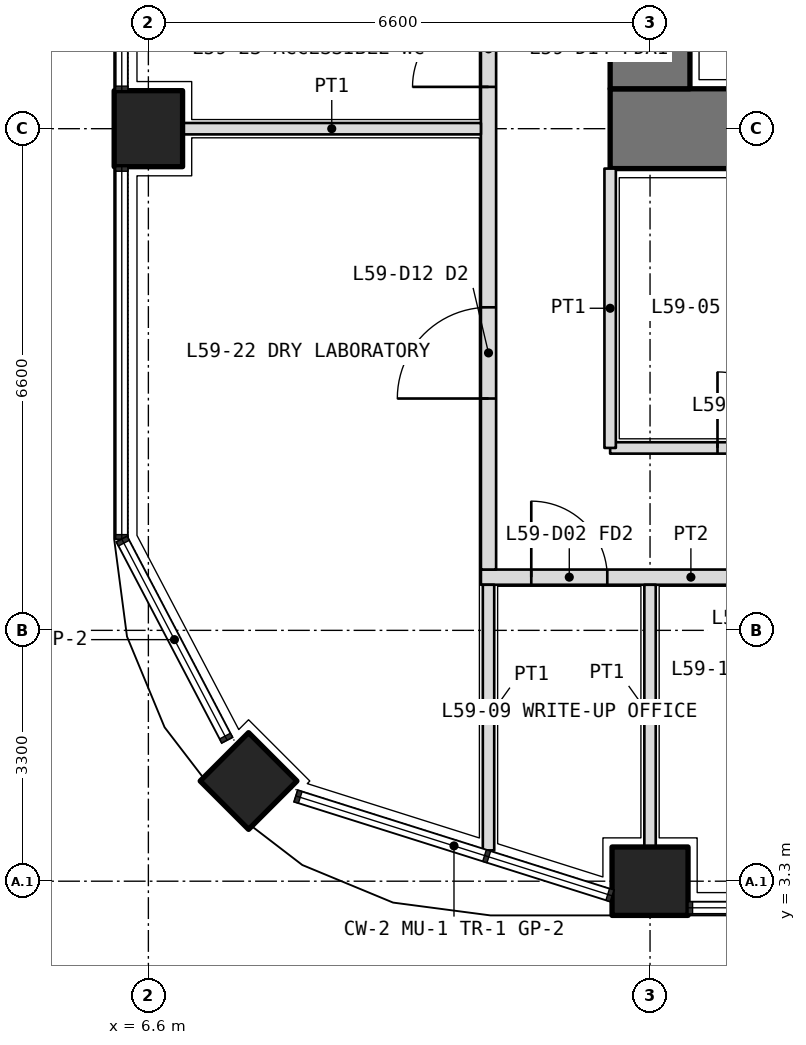
"""IFC4 building model, lengths in metres.
Left out: names, types, materials, properties, quantities, classifications, styles, units other than length and angle.
Written with IfcOpenShell. Run it as: python <this file> out.ifc"""

import sys

from ifc_helpers import new_model, si_unit, direction, frame, frame_2d, origin, origin_2d, place, context, subcontext, project, spatial, rectangle, extrude, element, fill, save


model = new_model("IFC4")
c1 = context("Model", 3, precision=1e-05, world=origin(), true_north=direction((0.0, 1.0)))
c2 = subcontext(c1, "Body", "Model", "MODEL_VIEW")
j1 = project(units=[si_unit("LENGTHUNIT", "METRE"), si_unit("PLANEANGLEUNIT", "RADIAN")], contexts=[c1])
p1 = place(None, origin())
s1 = spatial("IfcSite", under=j1, at=p1, CompositionType="ELEMENT")
p2 = place(p1, origin())
s2 = spatial("IfcBuilding", under=s1, at=p2, CompositionType="ELEMENT")
p3 = place(p2, frame((0.0, 0.0, 258.6)))
s3 = spatial("IfcBuildingStorey", under=s2, at=p3, CompositionType="ELEMENT", Elevation=258.6)
p4 = place(p3, frame((7.918, 4.618, 0.0), z_axis=(0.0, 0.0, 1.0), x_axis=(0.707106781187, 0.707106781187, 0.0)))
e1 = element("IfcColumn", 1, at=p4, inside=s3, PredefinedType="COLUMN", context=c2, shape_type="SweptSolid", body=[
    extrude(rectangle(XDim=0.9, YDim=0.9, at=origin_2d()), origin(), (0.0, 0.0, 1.0), 4.2),
])
for number, where, z_axis, x_axis in (
    (2, (13.2, 3.3, 0.0), (0.0, 0.0, 1.0), (1.0, 0.0, 0.0)),
    (3, (6.6, 13.2, 0.0), (0.0, 0.0, 1.0), (0.0, 1.0, 0.0)),
):
    element("IfcColumn", number, at=place(p3, frame(where, z_axis=z_axis, x_axis=x_axis)), inside=s3, PredefinedType="COLUMN", context=c2, shape_type="SweptSolid", body=[
        extrude(rectangle(XDim=1.0, YDim=0.9, at=origin_2d()), origin(), (0.0, 0.0, 1.0), 4.2),
    ])
p5 = place(p3, frame((12.675, 13.2, 0.0), z_axis=(0.0, 0.0, 1.0), x_axis=(1.0, 0.0, 0.0)))
e4 = element("IfcWall", 4, at=p5, inside=s3, PredefinedType="SHEAR", context=c2, shape_type="SweptSolid", body=[
    extrude(rectangle(XDim=27.45, YDim=1.05, at=frame_2d((13.725, 0.0))), origin(), (0.0, 0.0, 1.0), 4.2),
])
p6 = place(p3, frame((13.2, 32.475, 0.0), z_axis=(0.0, 0.0, 1.0), x_axis=(0.0, -1.0, 0.0)))
e5 = element("IfcWall", 5, at=p6, inside=s3, PredefinedType="SHEAR", context=c2, shape_type="SweptSolid", body=[
    extrude(rectangle(XDim=18.75, YDim=1.05, at=frame_2d((9.375, 0.0))), origin(), (0.0, 0.0, 1.0), 4.2),
])
p7 = place(p6, frame((14.125, 0.0, 0.0)))
e6 = element("IfcOpeningElement", 6, at=p7, cuts=e5, PredefinedType="OPENING", context=c2, shape_type="SweptSolid", body=[
    extrude(rectangle(XDim=1.6, YDim=2.1, at=frame_2d((0.8, 1.05))), frame((0.0, 0.535, 0.0), z_axis=(0.0, -1.0, 0.0), x_axis=(1.0, 0.0, 0.0)), (0.0, 0.0, 1.0), 1.07),
])
p8 = place(p6, frame((3.325, 0.0, 0.0)))
e7 = element("IfcOpeningElement", 7, at=p8, cuts=e5, PredefinedType="OPENING", context=c2, shape_type="SweptSolid", body=[
    extrude(rectangle(XDim=1.6, YDim=2.1, at=frame_2d((0.8, 1.05))), frame((0.0, 0.535, 0.0), z_axis=(0.0, -1.0, 0.0), x_axis=(1.0, 0.0, 0.0)), (0.0, 0.0, 1.0), 1.07),
])
p9 = place(p3, frame((12.675, 9.0, 0.0), z_axis=(0.0, 0.0, 1.0), x_axis=(1.0, 0.0, 0.0)))
e8 = element("IfcWall", 8, at=p9, inside=s3, PredefinedType="PARTITIONING", context=c2, shape_type="SweptSolid", body=[
    extrude(rectangle(XDim=27.45, YDim=0.15, at=frame_2d((13.725, 0.0))), origin(), (0.0, 0.0, 1.0), 3.0),
])
p10 = place(p9, frame((1.413, 0.0, 0.0)))
e9 = element("IfcOpeningElement", 9, at=p10, cuts=e8, PredefinedType="OPENING", context=c2, shape_type="SweptSolid", body=[
    extrude(rectangle(XDim=1.0, YDim=2.1, at=frame_2d((0.5, 1.05))), frame((0.0, 0.085, 0.0), z_axis=(0.0, -1.0, 0.0), x_axis=(1.0, 0.0, 0.0)), (0.0, 0.0, 1.0), 0.17),
])
p11 = place(p9, frame((8.275, 0.0, 0.0)))
e10 = element("IfcOpeningElement", 10, at=p11, cuts=e8, PredefinedType="OPENING", context=c2, shape_type="SweptSolid", body=[
    extrude(rectangle(XDim=1.0, YDim=2.1, at=frame_2d((0.5, 1.05))), frame((0.0, 0.085, 0.0), z_axis=(0.0, -1.0, 0.0), x_axis=(1.0, 0.0, 0.0)), (0.0, 0.0, 1.0), 0.17),
])
p12 = place(p9, frame((14.875, 0.0, 0.0)))
e11 = element("IfcOpeningElement", 11, at=p12, cuts=e8, PredefinedType="OPENING", context=c2, shape_type="SweptSolid", body=[
    extrude(rectangle(XDim=1.0, YDim=2.1, at=frame_2d((0.5, 1.05))), frame((0.0, 0.085, 0.0), z_axis=(0.0, -1.0, 0.0), x_axis=(1.0, 0.0, 0.0)), (0.0, 0.0, 1.0), 0.17),
])
p13 = place(p9, frame((21.738, 0.0, 0.0)))
e12 = element("IfcOpeningElement", 12, at=p13, cuts=e8, PredefinedType="OPENING", context=c2, shape_type="SweptSolid", body=[
    extrude(rectangle(XDim=1.0, YDim=2.1, at=frame_2d((0.5, 1.05))), frame((0.0, 0.085, 0.0), z_axis=(0.0, -1.0, 0.0), x_axis=(1.0, 0.0, 0.0)), (0.0, 0.0, 1.0), 0.17),
])
p14 = place(p3, frame((12.675, 12.675, 0.0), z_axis=(0.0, 0.0, 1.0), x_axis=(0.0, -1.0, 0.0)))
e13 = element("IfcWall", 13, at=p14, inside=s3, PredefinedType="PARTITIONING", context=c2, shape_type="SweptSolid", body=[
    extrude(rectangle(XDim=3.675, YDim=0.15, at=frame_2d((1.837, 0.0))), origin(), (0.0, 0.0, 1.0), 3.0),
])
p15 = place(p3, frame((10.975, 7.3, 0.0), z_axis=(0.0, 0.0, 1.0), x_axis=(1.0, 0.0, 0.0)))
e14 = element("IfcWall", 14, at=p15, inside=s3, PredefinedType="PARTITIONING", context=c2, shape_type="SweptSolid", body=[
    extrude(rectangle(XDim=5.525, YDim=0.2, at=frame_2d((2.762, 0.0))), origin(), (0.0, 0.0, 1.0), 3.0),
])
p16 = place(p15, frame((0.663, 0.0, 0.0)))
e15 = element("IfcOpeningElement", 15, at=p16, cuts=e14, PredefinedType="OPENING", context=c2, shape_type="SweptSolid", body=[
    extrude(rectangle(XDim=1.0, YDim=2.1, at=frame_2d((0.5, 1.05))), frame((0.0, 0.11, 0.0), z_axis=(0.0, -1.0, 0.0), x_axis=(1.0, 0.0, 0.0)), (0.0, 0.0, 1.0), 0.22),
])
p17 = place(p15, frame((3.375, 0.0, 0.0)))
e16 = element("IfcOpeningElement", 16, at=p17, cuts=e14, PredefinedType="OPENING", context=c2, shape_type="SweptSolid", body=[
    extrude(rectangle(XDim=1.0, YDim=2.1, at=frame_2d((0.5, 1.05))), frame((0.0, 0.11, 0.0), z_axis=(0.0, -1.0, 0.0), x_axis=(1.0, 0.0, 0.0)), (0.0, 0.0, 1.0), 0.22),
])
p18 = place(p3, frame((11.075, 7.4, 0.0), z_axis=(0.0, 0.0, 1.0), x_axis=(0.0, 1.0, 0.0)))
e17 = element("IfcWall", 17, at=p18, inside=s3, PredefinedType="PARTITIONING", context=c2, shape_type="SweptSolid", body=[
    extrude(rectangle(XDim=31.4, YDim=0.2, at=frame_2d((15.7, 0.0))), origin(), (0.0, 0.0, 1.0), 3.0),
])
p19 = place(p18, frame((2.25, 0.0, 0.0)))
e18 = element("IfcOpeningElement", 18, at=p19, cuts=e17, PredefinedType="OPENING", context=c2, shape_type="SweptSolid", body=[
    extrude(rectangle(XDim=1.2, YDim=2.1, at=frame_2d((0.6, 1.05))), frame((0.0, 0.11, 0.0), z_axis=(0.0, -1.0, 0.0), x_axis=(1.0, 0.0, 0.0)), (0.0, 0.0, 1.0), 0.22),
])
p20 = place(p18, frame((6.35, 0.0, 0.0)))
e19 = element("IfcOpeningElement", 19, at=p20, cuts=e17, PredefinedType="OPENING", context=c2, shape_type="SweptSolid", body=[
    extrude(rectangle(XDim=1.0, YDim=2.1, at=frame_2d((0.5, 1.05))), frame((0.0, 0.11, 0.0), z_axis=(0.0, -1.0, 0.0), x_axis=(1.0, 0.0, 0.0)), (0.0, 0.0, 1.0), 0.22),
])
p21 = place(p18, frame((9.45, 0.0, 0.0)))
e20 = element("IfcOpeningElement", 20, at=p21, cuts=e17, PredefinedType="OPENING", context=c2, shape_type="SweptSolid", body=[
    extrude(rectangle(XDim=0.9, YDim=2.1, at=frame_2d((0.45, 1.05))), frame((0.0, 0.11, 0.0), z_axis=(0.0, -1.0, 0.0), x_axis=(1.0, 0.0, 0.0)), (0.0, 0.0, 1.0), 0.22),
])
p22 = place(p18, frame((13.35, 0.0, 0.0)))
e21 = element("IfcOpeningElement", 21, at=p22, cuts=e17, PredefinedType="OPENING", context=c2, shape_type="SweptSolid", body=[
    extrude(rectangle(XDim=0.9, YDim=2.1, at=frame_2d((0.45, 1.05))), frame((0.0, 0.11, 0.0), z_axis=(0.0, -1.0, 0.0), x_axis=(1.0, 0.0, 0.0)), (0.0, 0.0, 1.0), 0.22),
])
p23 = place(p18, frame((16.85, 0.0, 0.0)))
e22 = element("IfcOpeningElement", 22, at=p23, cuts=e17, PredefinedType="OPENING", context=c2, shape_type="SweptSolid", body=[
    extrude(rectangle(XDim=1.0, YDim=2.1, at=frame_2d((0.5, 1.05))), frame((0.0, 0.11, 0.0), z_axis=(0.0, -1.0, 0.0), x_axis=(1.0, 0.0, 0.0)), (0.0, 0.0, 1.0), 0.22),
])
p24 = place(p18, frame((24.75, 0.0, 0.0)))
e23 = element("IfcOpeningElement", 23, at=p24, cuts=e17, PredefinedType="OPENING", context=c2, shape_type="SweptSolid", body=[
    extrude(rectangle(XDim=1.0, YDim=2.1, at=frame_2d((0.5, 1.05))), frame((0.0, 0.11, 0.0), z_axis=(0.0, -1.0, 0.0), x_axis=(1.0, 0.0, 0.0)), (0.0, 0.0, 1.0), 0.22),
])
p25 = place(p3, frame((11.075, 3.705, 0.0), z_axis=(0.0, 0.0, 1.0), x_axis=(0.0, 1.0, 0.0)))
e24 = element("IfcWall", 24, at=p25, inside=s3, PredefinedType="PARTITIONING", context=c2, shape_type="SweptSolid", body=[
    extrude(rectangle(XDim=3.495, YDim=0.15, at=frame_2d((1.748, 0.0))), origin(), (0.0, 0.0, 1.0), 2.7),
])
p26 = place(p3, frame((13.2, 3.75, 0.0), z_axis=(0.0, 0.0, 1.0), x_axis=(0.0, 1.0, 0.0)))
e25 = element("IfcWall", 25, at=p26, inside=s3, PredefinedType="PARTITIONING", context=c2, shape_type="SweptSolid", body=[
    extrude(rectangle(XDim=3.45, YDim=0.15, at=frame_2d((1.725, 0.0))), origin(), (0.0, 0.0, 1.0), 3.0),
])
p27 = place(p3, frame((7.05, 13.2, 0.0), z_axis=(0.0, 0.0, 1.0), x_axis=(1.0, 0.0, 0.0)))
e26 = element("IfcWall", 26, at=p27, inside=s3, PredefinedType="PARTITIONING", context=c2, shape_type="SweptSolid", body=[
    extrude(rectangle(XDim=3.925, YDim=0.15, at=frame_2d((1.962, 0.0))), origin(), (0.0, 0.0, 1.0), 3.0),
])
p28 = place(p10, origin())
e27 = element("IfcDoor", 27, at=p28, inside=s3, OperationType="SINGLE_SWING_LEFT", PredefinedType="DOOR", context=c2, shape_type="SweptSolid", body=[
    extrude(rectangle(XDim=1.0, YDim=2.1, at=frame_2d((0.5, 1.05))), frame((0.0, 0.025, 0.0), z_axis=(0.0, -1.0, 0.0), x_axis=(1.0, 0.0, 0.0)), (0.0, 0.0, 1.0), 0.05),
])
fill(e9, e27)
p29 = place(p16, origin())
e28 = element("IfcDoor", 28, at=p29, inside=s3, OperationType="SINGLE_SWING_LEFT", PredefinedType="DOOR", context=c2, shape_type="SweptSolid", body=[
    extrude(rectangle(XDim=1.0, YDim=2.1, at=frame_2d((0.5, 1.05))), frame((0.0, 0.025, 0.0), z_axis=(0.0, -1.0, 0.0), x_axis=(1.0, 0.0, 0.0)), (0.0, 0.0, 1.0), 0.05),
])
fill(e15, e28)
p30 = place(p19, origin())
e29 = element("IfcDoor", 29, at=p30, inside=s3, OperationType="DOUBLE_DOOR_SINGLE_SWING", PredefinedType="DOOR", context=c2, shape_type="SweptSolid", body=[
    extrude(rectangle(XDim=1.2, YDim=2.1, at=frame_2d((0.6, 1.05))), frame((0.0, 0.025, 0.0), z_axis=(0.0, -1.0, 0.0), x_axis=(1.0, 0.0, 0.0)), (0.0, 0.0, 1.0), 0.05),
])
fill(e18, e29)
p31 = place(p20, origin())
e30 = element("IfcDoor", 30, at=p31, inside=s3, OperationType="SINGLE_SWING_LEFT", PredefinedType="DOOR", context=c2, shape_type="SweptSolid", body=[
    extrude(rectangle(XDim=1.0, YDim=2.1, at=frame_2d((0.5, 1.05))), frame((0.0, 0.025, 0.0), z_axis=(0.0, -1.0, 0.0), x_axis=(1.0, 0.0, 0.0)), (0.0, 0.0, 1.0), 0.05),
])
fill(e19, e30)
save(model, sys.argv[1])
